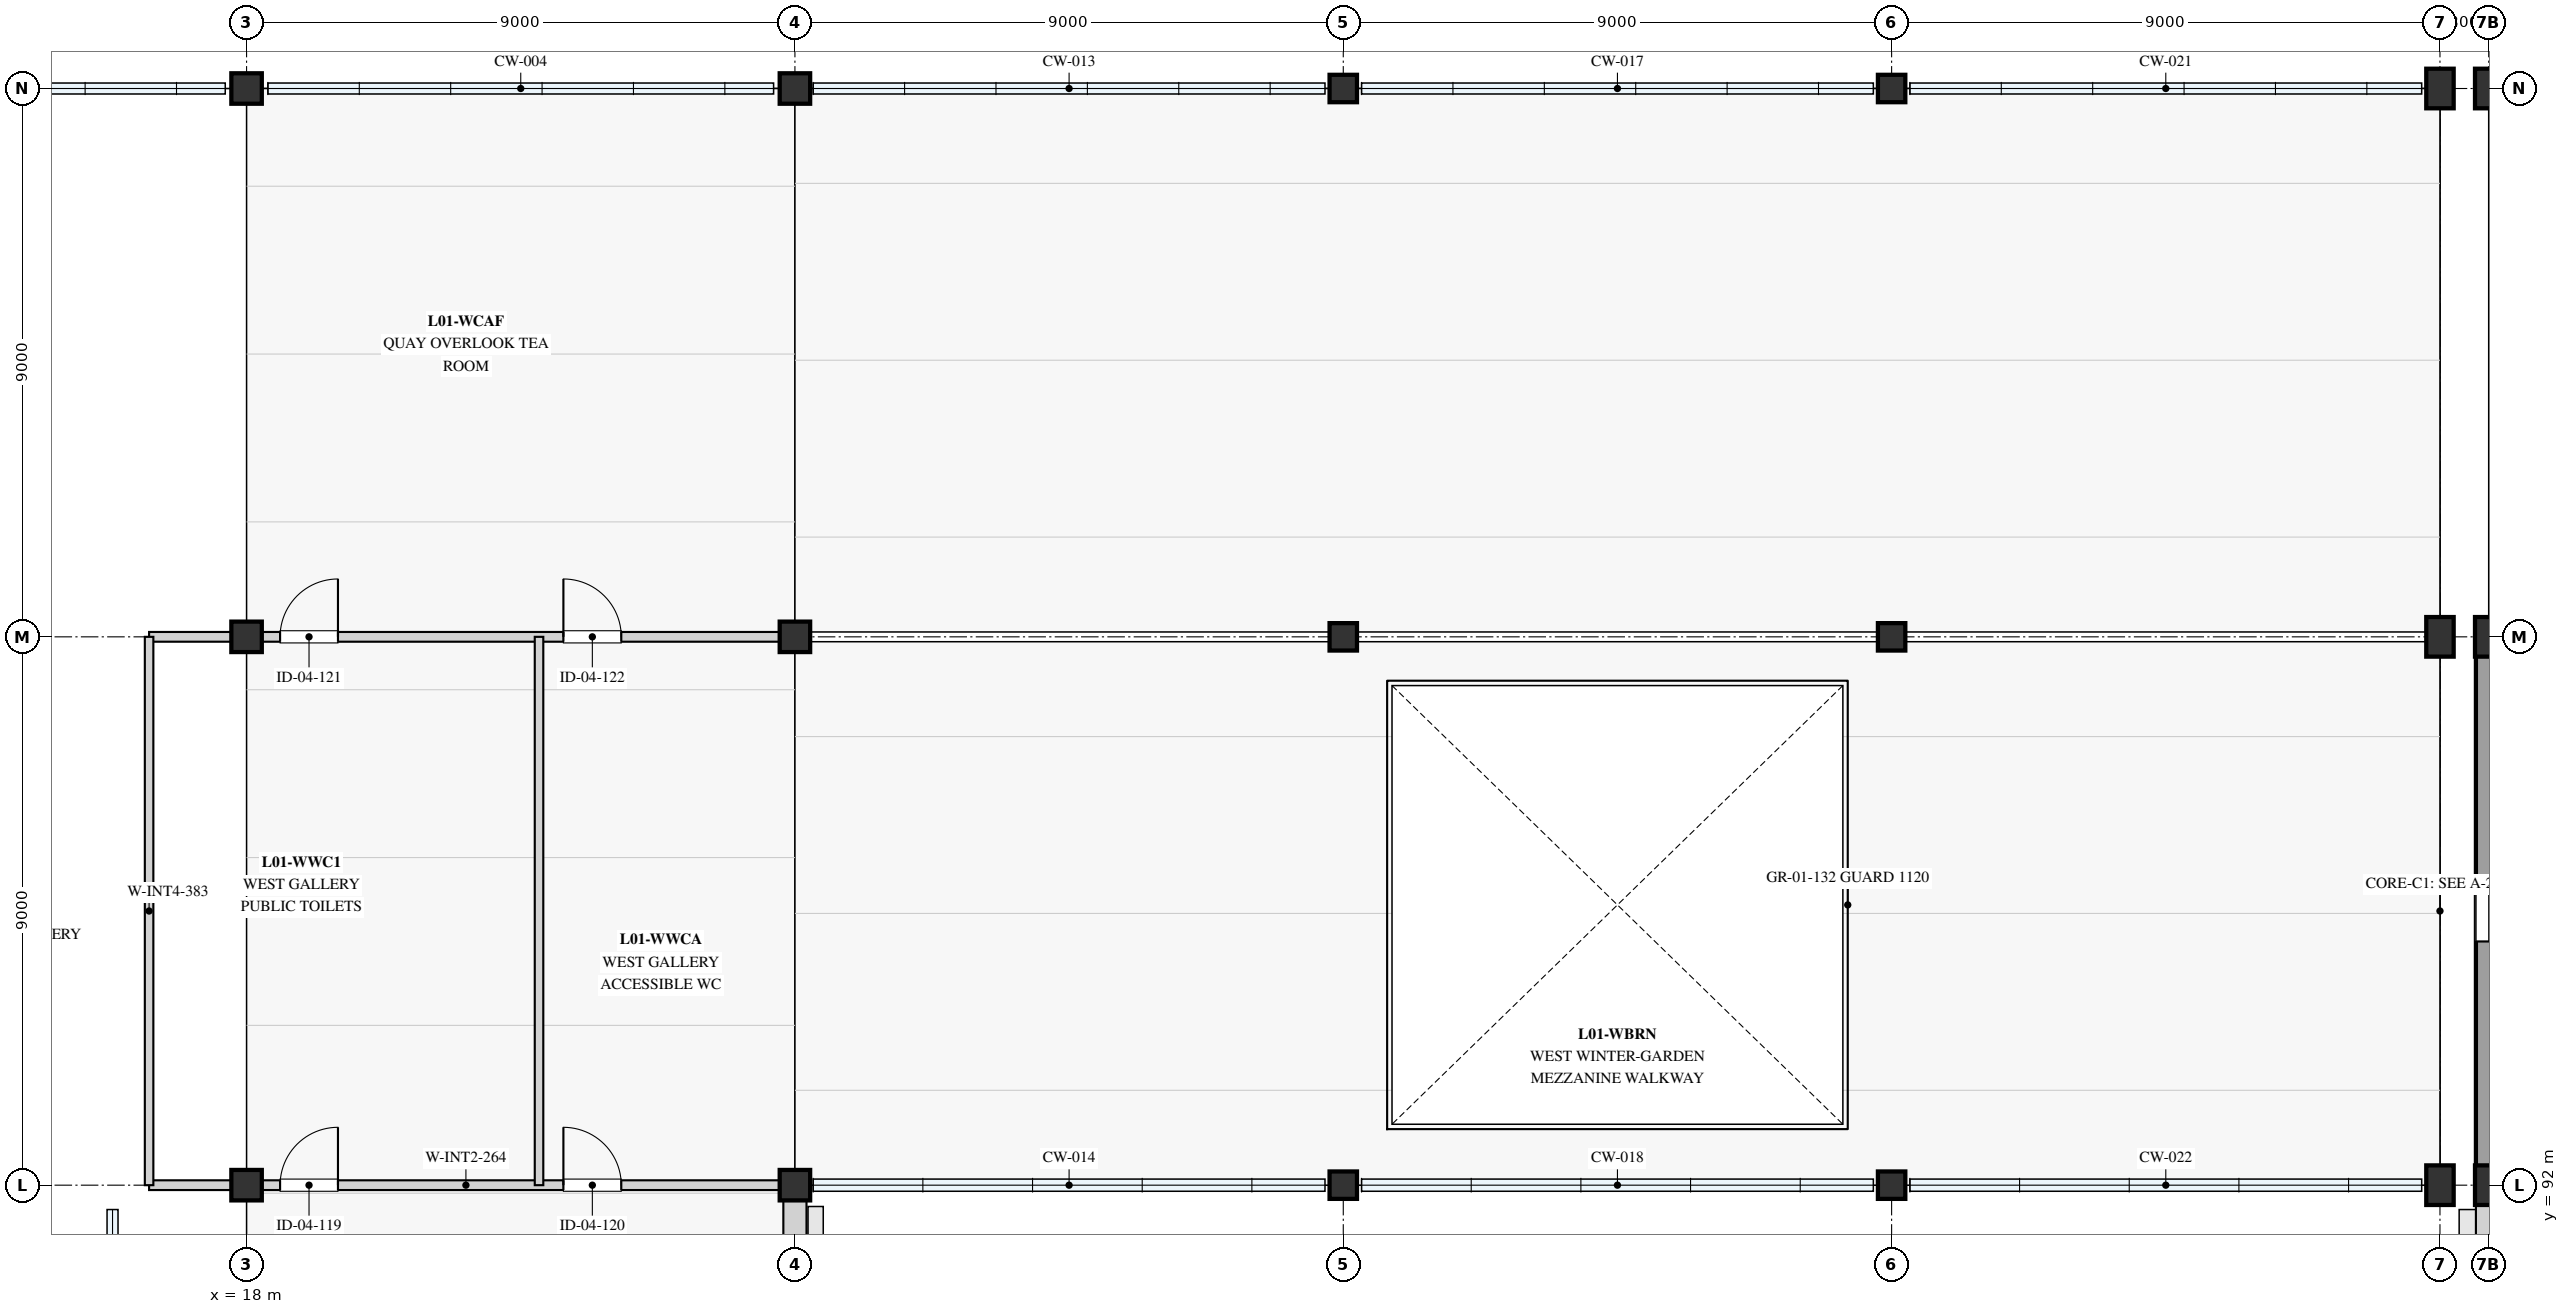
"""IFC4 building model, lengths in metres.
Left out: names, types, materials, properties, quantities, classifications, styles, units other than length and angle.
Written with IfcOpenShell. Run it as: python <this file> out.ifc"""

import sys

from ifc_helpers import new_model, si_unit, direction, frame, frame_2d, origin, origin_2d, place, context, subcontext, project, spatial, rectangle, extrude, element, fill, save


model = new_model("IFC4")
c1 = context("Model", 3, precision=1e-05, world=origin(), true_north=direction((0.0, 1.0)))
c2 = subcontext(c1, "Body", "Model", "MODEL_VIEW")
j1 = project(units=[si_unit("LENGTHUNIT", "METRE"), si_unit("PLANEANGLEUNIT", "RADIAN")], contexts=[c1])
p1 = place(None, origin())
s1 = spatial("IfcSite", under=j1, at=p1, CompositionType="ELEMENT")
p2 = place(p1, origin())
s2 = spatial("IfcBuilding", under=s1, at=p2, CompositionType="ELEMENT")
p3 = place(p2, frame((0.0, 0.0, 4.5)))
s3 = spatial("IfcBuildingStorey", under=s2, at=p3, CompositionType="ELEMENT", Elevation=4.5)
for number, where, z_axis, x_axis in (
    (1, (18.0, 92.0, 0.0), (0.0, 0.0, 1.0), (1.0, 0.0, 0.0)),
    (2, (18.0, 101.0, 0.0), (0.0, 0.0, 1.0), (1.0, 0.0, 0.0)),
    (3, (18.0, 110.0, 0.0), (0.0, 0.0, 1.0), (1.0, 0.0, 0.0)),
):
    element("IfcColumn", number, at=place(p3, frame(where, z_axis=z_axis, x_axis=x_axis)), inside=s3, PredefinedType="COLUMN", context=c2, shape_type="SweptSolid", body=[
        extrude(rectangle(XDim=0.5, YDim=0.5, at=origin_2d()), origin(), (0.0, 0.0, 1.0), 5.59),
    ])
for number, where, z_axis, x_axis in (
    (4, (27.0, 92.0, 0.0), (0.0, 0.0, 1.0), (1.0, 0.0, 0.0)),
    (5, (27.0, 101.0, 0.0), (0.0, 0.0, 1.0), (1.0, 0.0, 0.0)),
    (6, (27.0, 110.0, 0.0), (0.0, 0.0, 1.0), (1.0, 0.0, 0.0)),
):
    element("IfcColumn", number, at=place(p3, frame(where, z_axis=z_axis, x_axis=x_axis)), inside=s3, PredefinedType="COLUMN", context=c2, shape_type="SweptSolid", body=[
        extrude(rectangle(XDim=0.5, YDim=0.5, at=origin_2d()), origin(), (0.0, 0.0, 1.0), 3.59),
    ])
p4 = place(p3, frame((36.0, 92.0, 0.0), z_axis=(0.0, 0.0, 1.0), x_axis=(1.0, 0.0, 0.0)))
e7 = element("IfcColumn", 7, at=p4, inside=s3, PredefinedType="COLUMN", context=c2, shape_type="SweptSolid", body=[
    extrude(rectangle(XDim=0.45, YDim=0.45, at=origin_2d()), origin(), (0.0, 0.0, 1.0), 3.71),
])
p5 = place(p3, frame((36.0, 101.0, 0.0), z_axis=(0.0, 0.0, 1.0), x_axis=(1.0, 0.0, 0.0)))
e8 = element("IfcColumn", 8, at=p5, inside=s3, PredefinedType="COLUMN", context=c2, shape_type="SweptSolid", body=[
    extrude(rectangle(XDim=0.45, YDim=0.45, at=origin_2d()), origin(), (0.0, 0.0, 1.0), 5.71),
])
for number, where, z_axis, x_axis in (
    (9, (36.0, 110.0, 0.0), (0.0, 0.0, 1.0), (1.0, 0.0, 0.0)),
    (10, (45.0, 92.0, 0.0), (0.0, 0.0, 1.0), (1.0, 0.0, 0.0)),
):
    element("IfcColumn", number, at=place(p3, frame(where, z_axis=z_axis, x_axis=x_axis)), inside=s3, PredefinedType="COLUMN", context=c2, shape_type="SweptSolid", body=[
        extrude(rectangle(XDim=0.45, YDim=0.45, at=origin_2d()), origin(), (0.0, 0.0, 1.0), 3.71),
    ])
p6 = place(p3, frame((45.0, 101.0, 0.0), z_axis=(0.0, 0.0, 1.0), x_axis=(1.0, 0.0, 0.0)))
e11 = element("IfcColumn", 11, at=p6, inside=s3, PredefinedType="COLUMN", context=c2, shape_type="SweptSolid", body=[
    extrude(rectangle(XDim=0.45, YDim=0.45, at=origin_2d()), origin(), (0.0, 0.0, 1.0), 5.71),
])
p7 = place(p3, frame((45.0, 110.0, 0.0), z_axis=(0.0, 0.0, 1.0), x_axis=(1.0, 0.0, 0.0)))
e12 = element("IfcColumn", 12, at=p7, inside=s3, PredefinedType="COLUMN", context=c2, shape_type="SweptSolid", body=[
    extrude(rectangle(XDim=0.45, YDim=0.45, at=origin_2d()), origin(), (0.0, 0.0, 1.0), 3.71),
])
p8 = place(p3, frame((54.0, 92.0, 0.0), z_axis=(0.0, 0.0, 1.0), x_axis=(1.0, 0.0, 0.0)))
e13 = element("IfcColumn", 13, at=p8, inside=s3, PredefinedType="COLUMN", context=c2, shape_type="SweptSolid", body=[
    extrude(rectangle(XDim=0.45, YDim=0.65, at=origin_2d()), origin(), (0.0, 0.0, 1.0), 3.71),
])
p9 = place(p3, frame((54.0, 101.0, 0.0), z_axis=(0.0, 0.0, 1.0), x_axis=(1.0, 0.0, 0.0)))
e14 = element("IfcColumn", 14, at=p9, inside=s3, PredefinedType="COLUMN", context=c2, shape_type="SweptSolid", body=[
    extrude(rectangle(XDim=0.45, YDim=0.65, at=origin_2d()), origin(), (0.0, 0.0, 1.0), 5.71),
])
p10 = place(p3, frame((54.0, 110.0, 0.0), z_axis=(0.0, 0.0, 1.0), x_axis=(1.0, 0.0, 0.0)))
e15 = element("IfcColumn", 15, at=p10, inside=s3, PredefinedType="COLUMN", context=c2, shape_type="SweptSolid", body=[
    extrude(rectangle(XDim=0.45, YDim=0.65, at=origin_2d()), origin(), (0.0, 0.0, 1.0), 3.71),
])
for number, where, z_axis, x_axis in (
    (16, (54.8, 92.0, 0.0), (0.0, 0.0, 1.0), (1.0, 0.0, 0.0)),
    (17, (54.8, 101.0, 0.0), (0.0, 0.0, 1.0), (1.0, 0.0, 0.0)),
):
    element("IfcColumn", number, at=place(p3, frame(where, z_axis=z_axis, x_axis=x_axis)), inside=s3, PredefinedType="COLUMN", context=c2, shape_type="SweptSolid", body=[
        extrude(rectangle(XDim=0.45, YDim=0.65, at=origin_2d()), origin(), (0.0, 0.0, 1.0), 3.9),
    ])
p11 = place(p3, frame((54.8, 110.0, 0.0), z_axis=(0.0, 0.0, 1.0), x_axis=(1.0, 0.0, 0.0)))
e18 = element("IfcColumn", 18, at=p11, inside=s3, PredefinedType="COLUMN", context=c2, shape_type="SweptSolid", body=[
    extrude(rectangle(XDim=0.45, YDim=0.65, at=origin_2d()), origin(), (0.0, 0.0, 1.0), 3.71),
])
p12 = place(p3, frame((27.0, 83.0, 0.0), z_axis=(0.0, 0.0, 1.0), x_axis=(0.0, 1.0, 0.0)))
e19 = element("IfcWall", 19, at=p12, inside=s3, PredefinedType="STANDARD", context=c2, shape_type="SweptSolid", body=[
    extrude(rectangle(XDim=9.0, YDim=0.38, at=frame_2d((4.5, 0.0))), origin(), (0.0, 0.0, 1.0), 3.48),
])
p13 = place(p12, frame((2.1, 0.0, 0.95)))
e20 = element("IfcOpeningElement", 20, at=p13, cuts=e19, PredefinedType="OPENING", context=c2, shape_type="SweptSolid", body=[
    extrude(rectangle(XDim=1.6, YDim=2.1, at=frame_2d((0.8, 1.05))), frame((0.0, 0.2, 0.0), z_axis=(0.0, -1.0, 0.0), x_axis=(1.0, 0.0, 0.0)), (0.0, 0.0, 1.0), 0.4),
])
p14 = place(p12, frame((5.3, 0.0, 0.95)))
e21 = element("IfcOpeningElement", 21, at=p14, cuts=e19, PredefinedType="OPENING", context=c2, shape_type="SweptSolid", body=[
    extrude(rectangle(XDim=1.6, YDim=2.1, at=frame_2d((0.8, 1.05))), frame((0.0, 0.2, 0.0), z_axis=(0.0, -1.0, 0.0), x_axis=(1.0, 0.0, 0.0)), (0.0, 0.0, 1.0), 0.4),
])
p15 = place(p3, frame((54.8, 92.0, 0.0), z_axis=(0.0, 0.0, 1.0), x_axis=(0.0, 1.0, 0.0)))
e22 = element("IfcWall", 22, at=p15, inside=s3, PredefinedType="STANDARD", context=c2, shape_type="SweptSolid", body=[
    extrude(rectangle(XDim=9.0, YDim=0.42, at=frame_2d((4.5, 0.0))), origin(), (0.0, 0.0, 1.0), 3.66),
])
p16 = place(p15, frame((4.0, 0.0, 0.35)))
e23 = element("IfcOpeningElement", 23, at=p16, cuts=e22, PredefinedType="OPENING", context=c2, shape_type="SweptSolid", body=[
    extrude(rectangle(XDim=0.9, YDim=2.4, at=frame_2d((0.45, 1.2))), frame((0.0, 0.22, 0.0), z_axis=(0.0, -1.0, 0.0), x_axis=(1.0, 0.0, 0.0)), (0.0, 0.0, 1.0), 0.44),
])
p17 = place(p3, frame((54.8, 83.0, 0.0), z_axis=(0.0, 0.0, 1.0), x_axis=(0.0, 1.0, 0.0)))
e24 = element("IfcWall", 24, at=p17, inside=s3, PredefinedType="STANDARD", context=c2, shape_type="SweptSolid", body=[
    extrude(rectangle(XDim=9.0, YDim=0.42, at=frame_2d((4.5, 0.0))), origin(), (0.0, 0.0, 1.0), 2.79),
])
p18 = place(p17, frame((1.8, 0.0, 0.35)))
e25 = element("IfcOpeningElement", 25, at=p18, cuts=e24, PredefinedType="OPENING", context=c2, shape_type="SweptSolid", body=[
    extrude(rectangle(XDim=2.4, YDim=2.26, at=frame_2d((1.2, 1.13))), frame((0.0, 0.22, 0.0), z_axis=(0.0, -1.0, 0.0), x_axis=(1.0, 0.0, 0.0)), (0.0, 0.0, 1.0), 0.44),
])
p19 = place(p17, frame((4.8, 0.0, 0.35)))
e26 = element("IfcOpeningElement", 26, at=p19, cuts=e24, PredefinedType="OPENING", context=c2, shape_type="SweptSolid", body=[
    extrude(rectangle(XDim=2.4, YDim=2.26, at=frame_2d((1.2, 1.13))), frame((0.0, 0.22, 0.0), z_axis=(0.0, -1.0, 0.0), x_axis=(1.0, 0.0, 0.0)), (0.0, 0.0, 1.0), 0.44),
])
p20 = place(p3, frame((16.4, 92.0, 0.0), z_axis=(0.0, 0.0, 1.0), x_axis=(1.0, 0.0, 0.0)))
e27 = element("IfcWall", 27, at=p20, inside=s3, PredefinedType="PARTITIONING", context=c2, shape_type="SweptSolid", body=[
    extrude(rectangle(XDim=10.4, YDim=0.16, at=frame_2d((5.2, 0.0))), origin(), (0.0, 0.0, 1.0), 2.65),
])
p21 = place(p20, frame((2.15, 0.0, 0.0)))
e28 = element("IfcOpeningElement", 28, at=p21, cuts=e27, PredefinedType="OPENING", context=c2, shape_type="SweptSolid", body=[
    extrude(rectangle(XDim=0.95, YDim=2.1, at=frame_2d((0.475, 1.05))), frame((0.0, 0.09, 0.0), z_axis=(0.0, -1.0, 0.0), x_axis=(1.0, 0.0, 0.0)), (0.0, 0.0, 1.0), 0.18),
])
p22 = place(p20, frame((6.8, 0.0, 0.0)))
e29 = element("IfcOpeningElement", 29, at=p22, cuts=e27, PredefinedType="OPENING", context=c2, shape_type="SweptSolid", body=[
    extrude(rectangle(XDim=0.95, YDim=2.1, at=frame_2d((0.475, 1.05))), frame((0.0, 0.09, 0.0), z_axis=(0.0, -1.0, 0.0), x_axis=(1.0, 0.0, 0.0)), (0.0, 0.0, 1.0), 0.18),
])
p23 = place(p3, frame((16.4, 101.0, 0.0), z_axis=(0.0, 0.0, 1.0), x_axis=(1.0, 0.0, 0.0)))
e30 = element("IfcWall", 30, at=p23, inside=s3, PredefinedType="PARTITIONING", context=c2, shape_type="SweptSolid", body=[
    extrude(rectangle(XDim=10.4, YDim=0.16, at=frame_2d((5.2, 0.0))), origin(), (0.0, 0.0, 1.0), 2.65),
])
p24 = place(p23, frame((2.15, 0.0, 0.0)))
e31 = element("IfcOpeningElement", 31, at=p24, cuts=e30, PredefinedType="OPENING", context=c2, shape_type="SweptSolid", body=[
    extrude(rectangle(XDim=0.95, YDim=2.1, at=frame_2d((0.475, 1.05))), frame((0.0, 0.09, 0.0), z_axis=(0.0, -1.0, 0.0), x_axis=(1.0, 0.0, 0.0)), (0.0, 0.0, 1.0), 0.18),
])
p25 = place(p23, frame((6.8, 0.0, 0.0)))
e32 = element("IfcOpeningElement", 32, at=p25, cuts=e30, PredefinedType="OPENING", context=c2, shape_type="SweptSolid", body=[
    extrude(rectangle(XDim=0.95, YDim=2.1, at=frame_2d((0.475, 1.05))), frame((0.0, 0.09, 0.0), z_axis=(0.0, -1.0, 0.0), x_axis=(1.0, 0.0, 0.0)), (0.0, 0.0, 1.0), 0.18),
])
for number, where, z_axis, x_axis in (
    (33, (16.4, 92.0, 0.0), (0.0, 0.0, 1.0), (0.0, 1.0, 0.0)),
    (34, (22.8, 92.0, 0.0), (0.0, 0.0, 1.0), (0.0, 1.0, 0.0)),
):
    element("IfcWall", number, at=place(p3, frame(where, z_axis=z_axis, x_axis=x_axis)), inside=s3, PredefinedType="PARTITIONING", context=c2, shape_type="SweptSolid", body=[
        extrude(rectangle(XDim=9.0, YDim=0.14, at=frame_2d((4.5, 0.0))), origin(), (0.0, 0.0, 1.0), 2.65),
    ])
p26 = place(p16, origin())
e35 = element("IfcWindow", 35, at=p26, inside=s3, PartitioningType="SINGLE_PANEL", PredefinedType="WINDOW", context=c2, shape_type="SweptSolid", body=[
    extrude(rectangle(XDim=0.9, YDim=2.4, at=frame_2d((0.45, 1.2))), frame((0.0, 0.03, 0.0), z_axis=(0.0, -1.0, 0.0), x_axis=(1.0, 0.0, 0.0)), (0.0, 0.0, 1.0), 0.06),
])
fill(e23, e35)
p27 = place(p21, origin())
e36 = element("IfcDoor", 36, at=p27, inside=s3, OperationType="SINGLE_SWING_RIGHT", PredefinedType="DOOR", context=c2, shape_type="SweptSolid", body=[
    extrude(rectangle(XDim=0.95, YDim=2.1, at=frame_2d((0.475, 1.05))), frame((0.0, 0.025, 0.0), z_axis=(0.0, -1.0, 0.0), x_axis=(1.0, 0.0, 0.0)), (0.0, 0.0, 1.0), 0.05),
])
fill(e28, e36)
p28 = place(p22, origin())
e37 = element("IfcDoor", 37, at=p28, inside=s3, OperationType="SINGLE_SWING_LEFT", PredefinedType="DOOR", context=c2, shape_type="SweptSolid", body=[
    extrude(rectangle(XDim=0.95, YDim=2.1, at=frame_2d((0.475, 1.05))), frame((0.0, 0.025, 0.0), z_axis=(0.0, -1.0, 0.0), x_axis=(1.0, 0.0, 0.0)), (0.0, 0.0, 1.0), 0.05),
])
fill(e29, e37)
p29 = place(p24, origin())
e38 = element("IfcDoor", 38, at=p29, inside=s3, OperationType="SINGLE_SWING_RIGHT", PredefinedType="DOOR", context=c2, shape_type="SweptSolid", body=[
    extrude(rectangle(XDim=0.95, YDim=2.1, at=frame_2d((0.475, 1.05))), frame((0.0, 0.025, 0.0), z_axis=(0.0, -1.0, 0.0), x_axis=(1.0, 0.0, 0.0)), (0.0, 0.0, 1.0), 0.05),
])
fill(e31, e38)
p30 = place(p25, origin())
e39 = element("IfcDoor", 39, at=p30, inside=s3, OperationType="SINGLE_SWING_LEFT", PredefinedType="DOOR", context=c2, shape_type="SweptSolid", body=[
    extrude(rectangle(XDim=0.95, YDim=2.1, at=frame_2d((0.475, 1.05))), frame((0.0, 0.025, 0.0), z_axis=(0.0, -1.0, 0.0), x_axis=(1.0, 0.0, 0.0)), (0.0, 0.0, 1.0), 0.05),
])
fill(e32, e39)
save(model, sys.argv[1])
